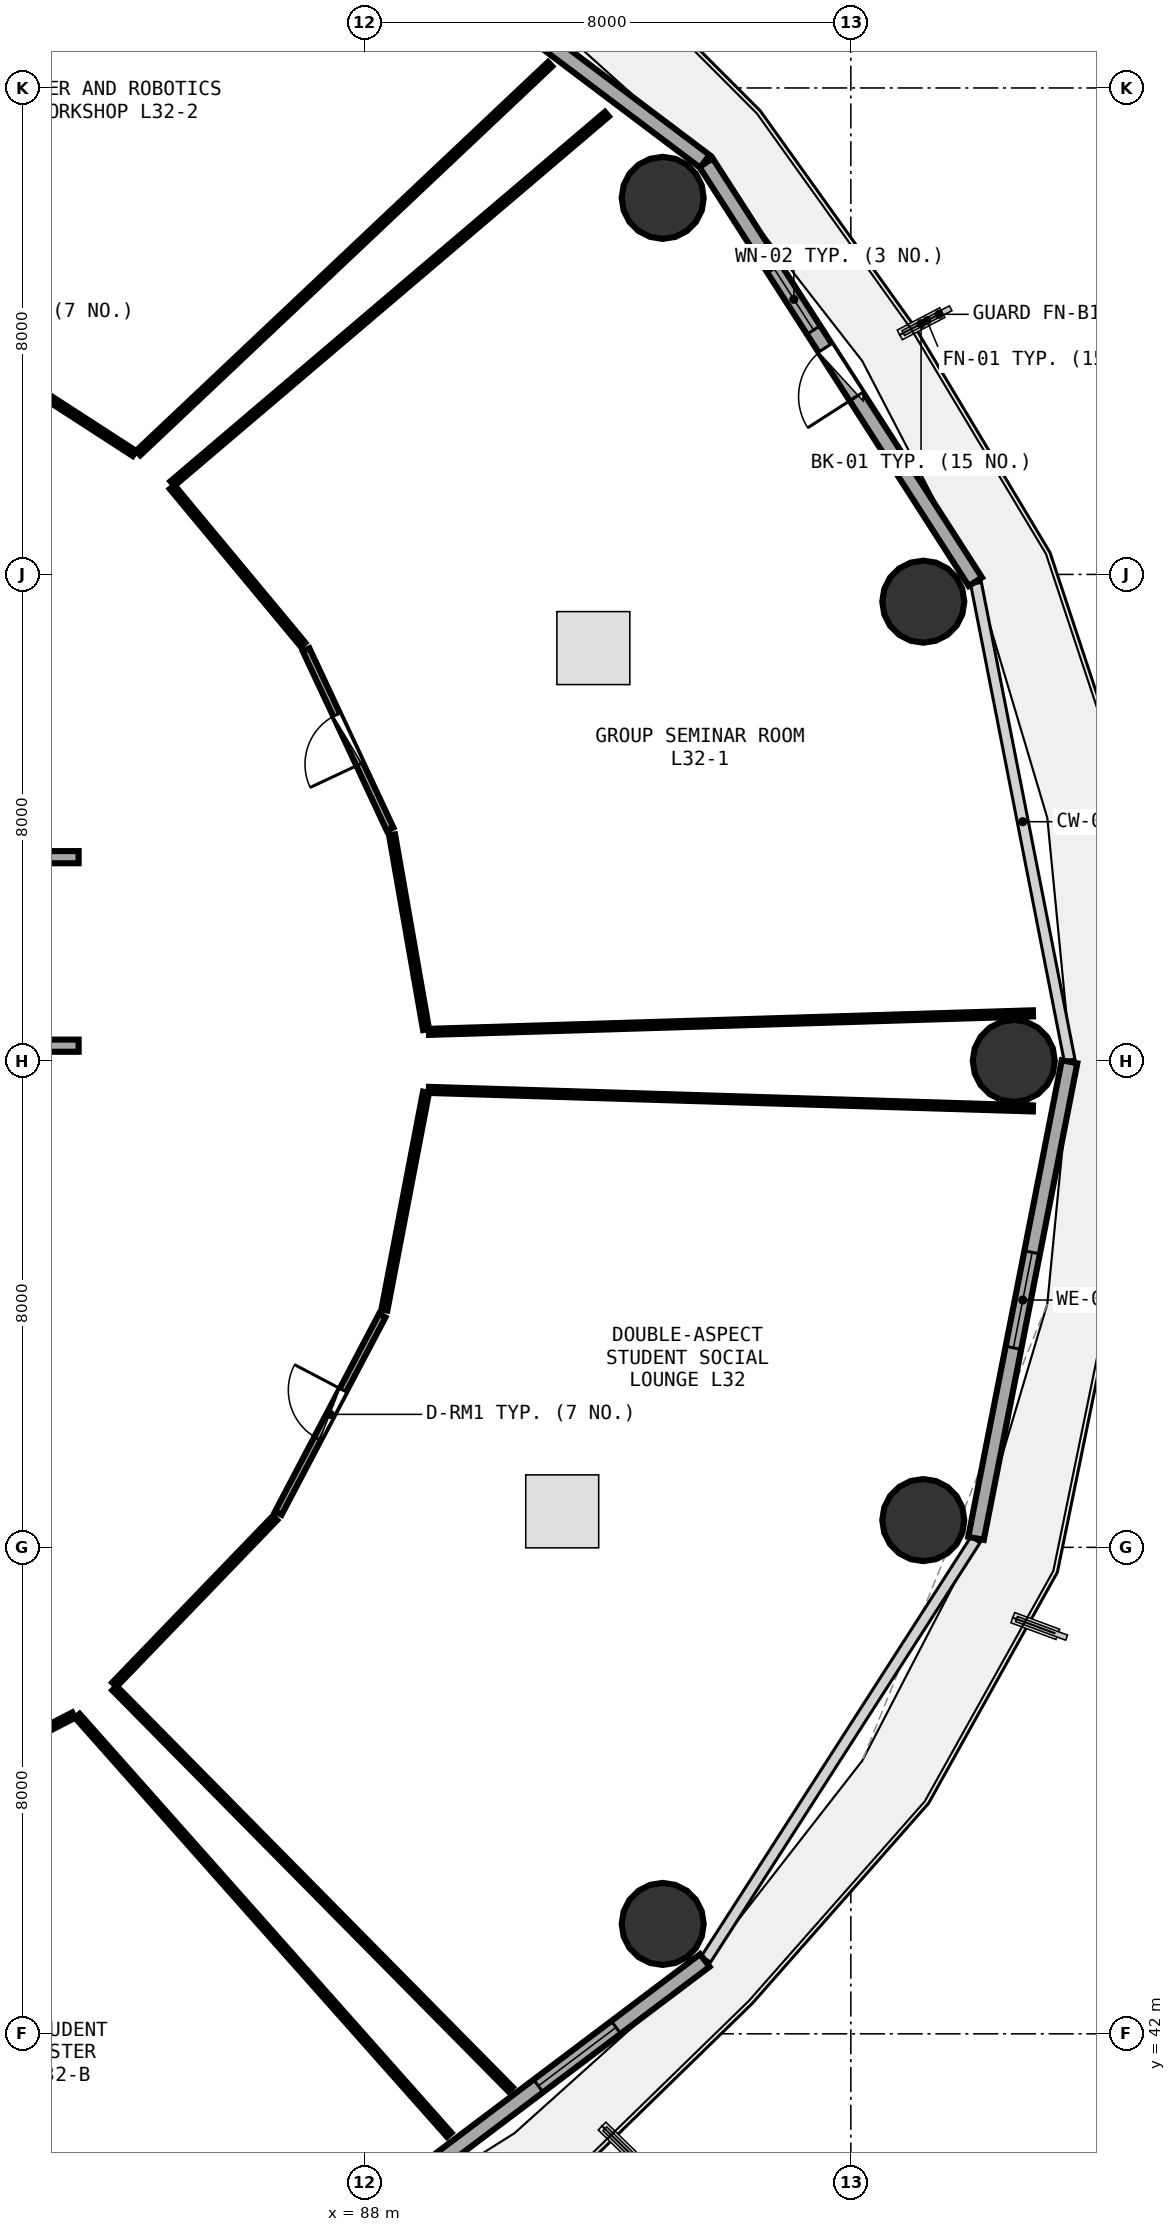
"""IFC4 building model, lengths in metres.
Left out: names, types, materials, properties, quantities, classifications, styles, units other than length and angle.
Written with IfcOpenShell. Run it as: python <this file> out.ifc"""

import sys

from ifc_helpers import new_model, si_unit, direction, frame, frame_2d, origin, origin_2d, place, context, subcontext, project, spatial, rectangle, circle, extrude, element, fill, save


model = new_model("IFC4")
c1 = context("Model", 3, precision=1e-05, world=origin(), true_north=direction((0.0, 1.0)))
c2 = subcontext(c1, "Body", "Model", "MODEL_VIEW")
j1 = project(units=[si_unit("LENGTHUNIT", "METRE"), si_unit("PLANEANGLEUNIT", "RADIAN")], contexts=[c1])
p1 = place(None, origin())
s1 = spatial("IfcSite", under=j1, at=p1, CompositionType="ELEMENT")
p2 = place(p1, origin())
s2 = spatial("IfcBuilding", under=s1, at=p2, CompositionType="ELEMENT")
p3 = place(p2, frame((0.0, 0.0, 125.1)))
s3 = spatial("IfcBuildingStorey", under=s2, at=p3, CompositionType="ELEMENT", Elevation=125.1)
for number, where, z_axis, x_axis in (
    (1, (98.68, 58.0, 0.0), (0.0, 0.0, 1.0), (1.0, 0.0, 0.0)),
    (2, (97.192, 65.552, 0.0), (0.0, 0.0, 1.0), (1.0, 0.0, 0.0)),
    (3, (92.906, 72.193, 0.0), (0.0, 0.0, 1.0), (1.0, 0.0, 0.0)),
    (4, (92.906, 43.807, 0.0), (0.0, 0.0, 1.0), (1.0, 0.0, 0.0)),
    (5, (97.192, 50.448, 0.0), (0.0, 0.0, 1.0), (1.0, 0.0, 0.0)),
):
    element("IfcColumn", number, at=place(p3, frame(where, z_axis=z_axis, x_axis=x_axis)), inside=s3, PredefinedType="COLUMN", context=c2, shape_type="SweptSolid", body=[
        extrude(circle(Radius=0.675, at=origin_2d()), origin(), (0.0, 0.0, 1.0), 4.76),
    ])
p4 = place(p3, frame((98.048, 65.879, 0.0), z_axis=(0.0, 0.0, 1.0), x_axis=(-0.540620528459, 0.841266571432, 0.0)))
e6 = element("IfcWall", 6, at=p4, inside=s3, PredefinedType="SOLIDWALL", context=c2, shape_type="SweptSolid", body=[
    extrude(rectangle(XDim=8.193, YDim=0.26, at=frame_2d((4.096, 0.0))), origin(), (0.0, 0.0, 1.0), 4.345),
])
p5 = place(p4, frame((3.621, 0.0, 0.0)))
e7 = element("IfcOpeningElement", 7, at=p5, cuts=e6, PredefinedType="OPENING", context=c2, shape_type="SweptSolid", body=[
    extrude(rectangle(XDim=0.95, YDim=2.1, at=frame_2d((0.475, 1.05))), frame((0.0, 0.14, 0.0), z_axis=(0.0, -1.0, 0.0), x_axis=(1.0, 0.0, 0.0)), (0.0, 0.0, 1.0), 0.28),
])
p6 = place(p4, frame((4.921, 0.0, 0.85)))
e8 = element("IfcOpeningElement", 8, at=p6, cuts=e6, PredefinedType="OPENING", context=c2, shape_type="SweptSolid", body=[
    extrude(rectangle(XDim=1.2, YDim=1.45, at=frame_2d((0.6, 0.725))), frame((0.0, 0.14, 0.0), z_axis=(0.0, -1.0, 0.0), x_axis=(1.0, 0.0, 0.0)), (0.0, 0.0, 1.0), 0.28),
])
p7 = place(p3, frame((93.599, 72.793, 0.0), z_axis=(0.0, 0.0, 1.0), x_axis=(-0.798501507879, 0.601992808857, 0.0)))
e9 = element("IfcWall", 9, at=p7, inside=s3, PredefinedType="SOLIDWALL", context=c2, shape_type="SweptSolid", body=[
    extrude(rectangle(XDim=8.499, YDim=0.26, at=frame_2d((4.25, 0.0))), origin(), (0.0, 0.0, 1.0), 4.345),
])
p8 = place(p7, frame((3.775, 0.0, 0.0)))
e10 = element("IfcOpeningElement", 10, at=p8, cuts=e9, PredefinedType="OPENING", context=c2, shape_type="SweptSolid", body=[
    extrude(rectangle(XDim=0.95, YDim=2.1, at=frame_2d((0.475, 1.05))), frame((0.0, 0.14, 0.0), z_axis=(0.0, -1.0, 0.0), x_axis=(1.0, 0.0, 0.0)), (0.0, 0.0, 1.0), 0.28),
])
p9 = place(p7, frame((5.075, 0.0, 0.85)))
e11 = element("IfcOpeningElement", 11, at=p9, cuts=e9, PredefinedType="OPENING", context=c2, shape_type="SweptSolid", body=[
    extrude(rectangle(XDim=1.2, YDim=1.45, at=frame_2d((0.6, 0.725))), frame((0.0, 0.14, 0.0), z_axis=(0.0, -1.0, 0.0), x_axis=(1.0, 0.0, 0.0)), (0.0, 0.0, 1.0), 0.28),
])
p10 = place(p3, frame((86.812, 38.09, 0.0), z_axis=(0.0, 0.0, 1.0), x_axis=(0.798501507879, 0.601992808857, 0.0)))
e12 = element("IfcWall", 12, at=p10, inside=s3, PredefinedType="SOLIDWALL", context=c2, shape_type="SweptSolid", body=[
    extrude(rectangle(XDim=8.499, YDim=0.26, at=frame_2d((4.25, 0.0))), origin(), (0.0, 0.0, 1.0), 4.345),
])
p11 = place(p10, frame((5.07, 0.0, 0.85)))
e13 = element("IfcOpeningElement", 13, at=p11, cuts=e12, PredefinedType="OPENING", context=c2, shape_type="SweptSolid", body=[
    extrude(rectangle(XDim=1.6, YDim=1.45, at=frame_2d((0.8, 0.725))), frame((0.0, 0.14, 0.0), z_axis=(0.0, -1.0, 0.0), x_axis=(1.0, 0.0, 0.0)), (0.0, 0.0, 1.0), 0.28),
])
p12 = place(p3, frame((98.059, 50.148, 0.0), z_axis=(0.0, 0.0, 1.0), x_axis=(0.192581843632, 0.981280914674, 0.0)))
e14 = element("IfcWall", 14, at=p12, inside=s3, PredefinedType="SOLIDWALL", context=c2, shape_type="SweptSolid", body=[
    extrude(rectangle(XDim=7.987, YDim=0.26, at=frame_2d((3.993, 0.0))), origin(), (0.0, 0.0, 1.0), 4.345),
])
p13 = place(p12, frame((3.193, 0.0, 0.85)))
e15 = element("IfcOpeningElement", 15, at=p13, cuts=e14, PredefinedType="OPENING", context=c2, shape_type="SweptSolid", body=[
    extrude(rectangle(XDim=1.6, YDim=1.45, at=frame_2d((0.8, 0.725))), frame((0.0, 0.14, 0.0), z_axis=(0.0, -1.0, 0.0), x_axis=(1.0, 0.0, 0.0)), (0.0, 0.0, 1.0), 0.28),
])
p14 = place(p3, frame((79.3, 61.35, 0.0), z_axis=(0.0, 0.0, 1.0), x_axis=(1.0, 0.0, 0.0)))
e16 = element("IfcWall", 16, at=p14, inside=s3, PredefinedType="SOLIDWALL", context=c2, shape_type="SweptSolid", body=[
    extrude(rectangle(XDim=4.0, YDim=0.2, at=frame_2d((2.0, 0.0))), origin(), (0.0, 0.0, 1.0), 3.645),
])
p15 = place(p14, frame((0.45, 0.0, 0.0)))
e17 = element("IfcOpeningElement", 17, at=p15, cuts=e16, PredefinedType="OPENING", context=c2, shape_type="SweptSolid", body=[
    extrude(rectangle(XDim=1.2, YDim=2.15, at=frame_2d((0.6, 1.075))), frame((0.0, 0.11, 0.0), z_axis=(0.0, -1.0, 0.0), x_axis=(1.0, 0.0, 0.0)), (0.0, 0.0, 1.0), 0.22),
])
p16 = place(p3, frame((79.3, 58.25, 0.0), z_axis=(0.0, 0.0, 1.0), x_axis=(1.0, 0.0, 0.0)))
e18 = element("IfcWall", 18, at=p16, inside=s3, PredefinedType="SOLIDWALL", context=c2, shape_type="SweptSolid", body=[
    extrude(rectangle(XDim=4.0, YDim=0.2, at=frame_2d((2.0, 0.0))), origin(), (0.0, 0.0, 1.0), 2.345),
])
p17 = place(p16, frame((0.5, 0.0, 0.0)))
e19 = element("IfcOpeningElement", 19, at=p17, cuts=e18, PredefinedType="OPENING", context=c2, shape_type="SweptSolid", body=[
    extrude(rectangle(XDim=1.1, YDim=2.1, at=frame_2d((0.55, 1.05))), frame((0.0, 0.11, 0.0), z_axis=(0.0, -1.0, 0.0), x_axis=(1.0, 0.0, 0.0)), (0.0, 0.0, 1.0), 0.22),
])
p18 = place(p3, frame((86.585, 50.563, 0.0), z_axis=(0.0, 0.0, 1.0), x_axis=(0.465507861705, 0.885043745072, 0.0)))
e20 = element("IfcWall", 20, at=p18, inside=s3, PredefinedType="PARTITIONING", context=c2, shape_type="SweptSolid", body=[
    extrude(rectangle(XDim=3.67, YDim=0.12, at=frame_2d((1.835, 0.0))), origin(), (0.0, 0.0, 1.0), 2.345),
])
p19 = place(p18, frame((1.385, 0.0, 0.0)))
e21 = element("IfcOpeningElement", 21, at=p19, cuts=e20, PredefinedType="OPENING", context=c2, shape_type="SweptSolid", body=[
    extrude(rectangle(XDim=0.9, YDim=2.08, at=frame_2d((0.45, 1.04))), frame((0.0, 0.07, 0.0), z_axis=(0.0, -1.0, 0.0), x_axis=(1.0, 0.0, 0.0)), (0.0, 0.0, 1.0), 0.14),
])
p20 = place(p3, frame((88.423, 61.811, 0.0), z_axis=(0.0, 0.0, 1.0), x_axis=(-0.424067007709, 0.905630814942, 0.0)))
e22 = element("IfcWall", 22, at=p20, inside=s3, PredefinedType="PARTITIONING", context=c2, shape_type="SweptSolid", body=[
    extrude(rectangle(XDim=3.257, YDim=0.12, at=frame_2d((1.628, 0.0))), origin(), (0.0, 0.0, 1.0), 2.345),
])
p21 = place(p20, frame((1.178, 0.0, 0.0)))
e23 = element("IfcOpeningElement", 23, at=p21, cuts=e22, PredefinedType="OPENING", context=c2, shape_type="SweptSolid", body=[
    extrude(rectangle(XDim=0.9, YDim=2.08, at=frame_2d((0.45, 1.04))), frame((0.0, 0.07, 0.0), z_axis=(0.0, -1.0, 0.0), x_axis=(1.0, 0.0, 0.0)), (0.0, 0.0, 1.0), 0.14),
])
p22 = place(p3, frame((79.503, 45.323, 0.0), z_axis=(0.0, 0.0, 1.0), x_axis=(0.888522350378, 0.458833338892, 0.0)))
e24 = element("IfcWall", 24, at=p22, inside=s3, PredefinedType="PARTITIONING", context=c2, shape_type="SweptSolid", body=[
    extrude(rectangle(XDim=4.18, YDim=0.1, at=frame_2d((2.09, 0.0))), origin(), (0.0, 0.0, 1.0), 2.345),
])
p23 = place(p3, frame((83.28, 47.229, 0.0), z_axis=(0.0, 0.0, 1.0), x_axis=(0.66384227407, -0.747872606235, 0.0)))
e25 = element("IfcWall", 25, at=p23, inside=s3, PredefinedType="PARTITIONING", context=c2, shape_type="SweptSolid", body=[
    extrude(rectangle(XDim=9.213, YDim=0.1, at=frame_2d((4.606, 0.0))), origin(), (0.0, 0.0, 1.0), 2.345),
])
p24 = place(p3, frame((83.889, 47.742, 0.0), z_axis=(0.0, 0.0, 1.0), x_axis=(0.693960990079, 0.720012600062, 0.0)))
e26 = element("IfcWall", 26, at=p24, inside=s3, PredefinedType="PARTITIONING", context=c2, shape_type="SweptSolid", body=[
    extrude(rectangle(XDim=3.805, YDim=0.1, at=frame_2d((1.902, 0.0))), origin(), (0.0, 0.0, 1.0), 2.345),
])
p25 = place(p3, frame((88.329, 53.903, 0.0), z_axis=(0.0, 0.0, 1.0), x_axis=(0.187816655174, 0.982204105082, 0.0)))
e27 = element("IfcWall", 27, at=p25, inside=s3, PredefinedType="PARTITIONING", context=c2, shape_type="SweptSolid", body=[
    extrude(rectangle(XDim=3.646, YDim=0.1, at=frame_2d((1.823, 0.0))), origin(), (0.0, 0.0, 1.0), 4.35),
])
p26 = place(p3, frame((89.061, 57.523, 0.0), z_axis=(0.0, 0.0, 1.0), x_axis=(0.999530731129, -0.030631969076, 0.0)))
e28 = element("IfcWall", 28, at=p26, inside=s3, PredefinedType="PARTITIONING", context=c2, shape_type="SweptSolid", body=[
    extrude(rectangle(XDim=9.939, YDim=0.1, at=frame_2d((4.969, 0.0))), origin(), (0.0, 0.0, 1.0), 2.345),
])
p27 = place(p3, frame((90.406, 41.085, 0.0), z_axis=(0.0, 0.0, 1.0), x_axis=(-0.702657333511, 0.71152840538, 0.0)))
e29 = element("IfcWall", 29, at=p27, inside=s3, PredefinedType="PARTITIONING", context=c2, shape_type="SweptSolid", body=[
    extrude(rectangle(XDim=9.275, YDim=0.1, at=frame_2d((4.637, 0.0))), origin(), (0.0, 0.0, 1.0), 2.345),
])
p28 = place(p3, frame((89.014, 58.515, 0.0), z_axis=(0.0, 0.0, 1.0), x_axis=(-0.172066965458, 0.985085254888, 0.0)))
e30 = element("IfcWall", 30, at=p28, inside=s3, PredefinedType="PARTITIONING", context=c2, shape_type="SweptSolid", body=[
    extrude(rectangle(XDim=3.251, YDim=0.1, at=frame_2d((1.625, 0.0))), origin(), (0.0, 0.0, 1.0), 4.35),
])
p29 = place(p3, frame((86.99, 64.846, 0.0), z_axis=(0.0, 0.0, 1.0), x_axis=(-0.638993310166, 0.769212291609, 0.0)))
e31 = element("IfcWall", 31, at=p29, inside=s3, PredefinedType="PARTITIONING", context=c2, shape_type="SweptSolid", body=[
    extrude(rectangle(XDim=3.369, YDim=0.1, at=frame_2d((1.685, 0.0))), origin(), (0.0, 0.0, 1.0), 2.345),
])
p30 = place(p3, frame((84.843, 67.494, 0.0), z_axis=(0.0, 0.0, 1.0), x_axis=(0.761881513516, 0.647716418939, 0.0)))
e32 = element("IfcWall", 32, at=p30, inside=s3, PredefinedType="PARTITIONING", context=c2, shape_type="SweptSolid", body=[
    extrude(rectangle(XDim=9.379, YDim=0.1, at=frame_2d((4.69, 0.0))), origin(), (0.0, 0.0, 1.0), 2.345),
])
p31 = place(p3, frame((98.995, 58.782, 0.0), z_axis=(0.0, 0.0, 1.0), x_axis=(-0.999530731129, -0.030631969076, 0.0)))
e33 = element("IfcWall", 33, at=p31, inside=s3, PredefinedType="PARTITIONING", context=c2, shape_type="SweptSolid", body=[
    extrude(rectangle(XDim=9.939, YDim=0.1, at=frame_2d((4.969, 0.0))), origin(), (0.0, 0.0, 1.0), 2.345),
])
p32 = place(p3, frame((84.216, 67.99, 0.0), z_axis=(0.0, 0.0, 1.0), x_axis=(-0.839536739544, 0.54330292007, 0.0)))
e34 = element("IfcWall", 34, at=p32, inside=s3, PredefinedType="PARTITIONING", context=c2, shape_type="SweptSolid", body=[
    extrude(rectangle(XDim=3.724, YDim=0.1, at=frame_2d((1.862, 0.0))), origin(), (0.0, 0.0, 1.0), 2.345),
])
p33 = place(p3, frame((91.055, 74.392, 0.0), z_axis=(0.0, 0.0, 1.0), x_axis=(-0.727197691168, -0.686428086518, 0.0)))
e35 = element("IfcWall", 35, at=p33, inside=s3, PredefinedType="PARTITIONING", context=c2, shape_type="SweptSolid", body=[
    extrude(rectangle(XDim=9.318, YDim=0.1, at=frame_2d((4.659, 0.0))), origin(), (0.0, 0.0, 1.0), 2.345),
])
p34 = place(p5, frame((0.95, 0.0, 0.0), z_axis=(0.0, 0.0, 1.0), x_axis=(-1.0, 0.0, 0.0)))
e36 = element("IfcDoor", 36, at=p34, inside=s3, OperationType="SINGLE_SWING_RIGHT", PredefinedType="DOOR", context=c2, shape_type="SweptSolid", body=[
    extrude(rectangle(XDim=0.95, YDim=2.1, at=frame_2d((0.475, 1.05))), frame((0.0, 0.025, 0.0), z_axis=(0.0, -1.0, 0.0), x_axis=(1.0, 0.0, 0.0)), (0.0, 0.0, 1.0), 0.05),
])
fill(e7, e36)
p35 = place(p6, origin())
e37 = element("IfcWindow", 37, at=p35, inside=s3, PartitioningType="SINGLE_PANEL", PredefinedType="WINDOW", context=c2, shape_type="SweptSolid", body=[
    extrude(rectangle(XDim=1.2, YDim=1.45, at=frame_2d((0.6, 0.725))), frame((0.0, 0.03, 0.0), z_axis=(0.0, -1.0, 0.0), x_axis=(1.0, 0.0, 0.0)), (0.0, 0.0, 1.0), 0.06),
])
fill(e8, e37)
p36 = place(p11, origin())
e38 = element("IfcWindow", 38, at=p36, inside=s3, PartitioningType="SINGLE_PANEL", PredefinedType="WINDOW", context=c2, shape_type="SweptSolid", body=[
    extrude(rectangle(XDim=1.6, YDim=1.45, at=frame_2d((0.8, 0.725))), frame((0.0, 0.03, 0.0), z_axis=(0.0, -1.0, 0.0), x_axis=(1.0, 0.0, 0.0)), (0.0, 0.0, 1.0), 0.06),
])
fill(e13, e38)
p37 = place(p13, origin())
e39 = element("IfcWindow", 39, at=p37, inside=s3, PartitioningType="SINGLE_PANEL", PredefinedType="WINDOW", context=c2, shape_type="SweptSolid", body=[
    extrude(rectangle(XDim=1.6, YDim=1.45, at=frame_2d((0.8, 0.725))), frame((0.0, 0.03, 0.0), z_axis=(0.0, -1.0, 0.0), x_axis=(1.0, 0.0, 0.0)), (0.0, 0.0, 1.0), 0.06),
])
fill(e15, e39)
p38 = place(p19, origin())
e40 = element("IfcDoor", 40, at=p38, inside=s3, OperationType="SINGLE_SWING_RIGHT", PredefinedType="DOOR", context=c2, shape_type="SweptSolid", body=[
    extrude(rectangle(XDim=0.9, YDim=2.08, at=frame_2d((0.45, 1.04))), frame((0.0, 0.025, 0.0), z_axis=(0.0, -1.0, 0.0), x_axis=(1.0, 0.0, 0.0)), (0.0, 0.0, 1.0), 0.05),
])
fill(e21, e40)
p39 = place(p21, origin())
e41 = element("IfcDoor", 41, at=p39, inside=s3, OperationType="SINGLE_SWING_LEFT", PredefinedType="DOOR", context=c2, shape_type="SweptSolid", body=[
    extrude(rectangle(XDim=0.9, YDim=2.08, at=frame_2d((0.45, 1.04))), frame((0.0, 0.025, 0.0), z_axis=(0.0, -1.0, 0.0), x_axis=(1.0, 0.0, 0.0)), (0.0, 0.0, 1.0), 0.05),
])
fill(e23, e41)
save(model, sys.argv[1])
